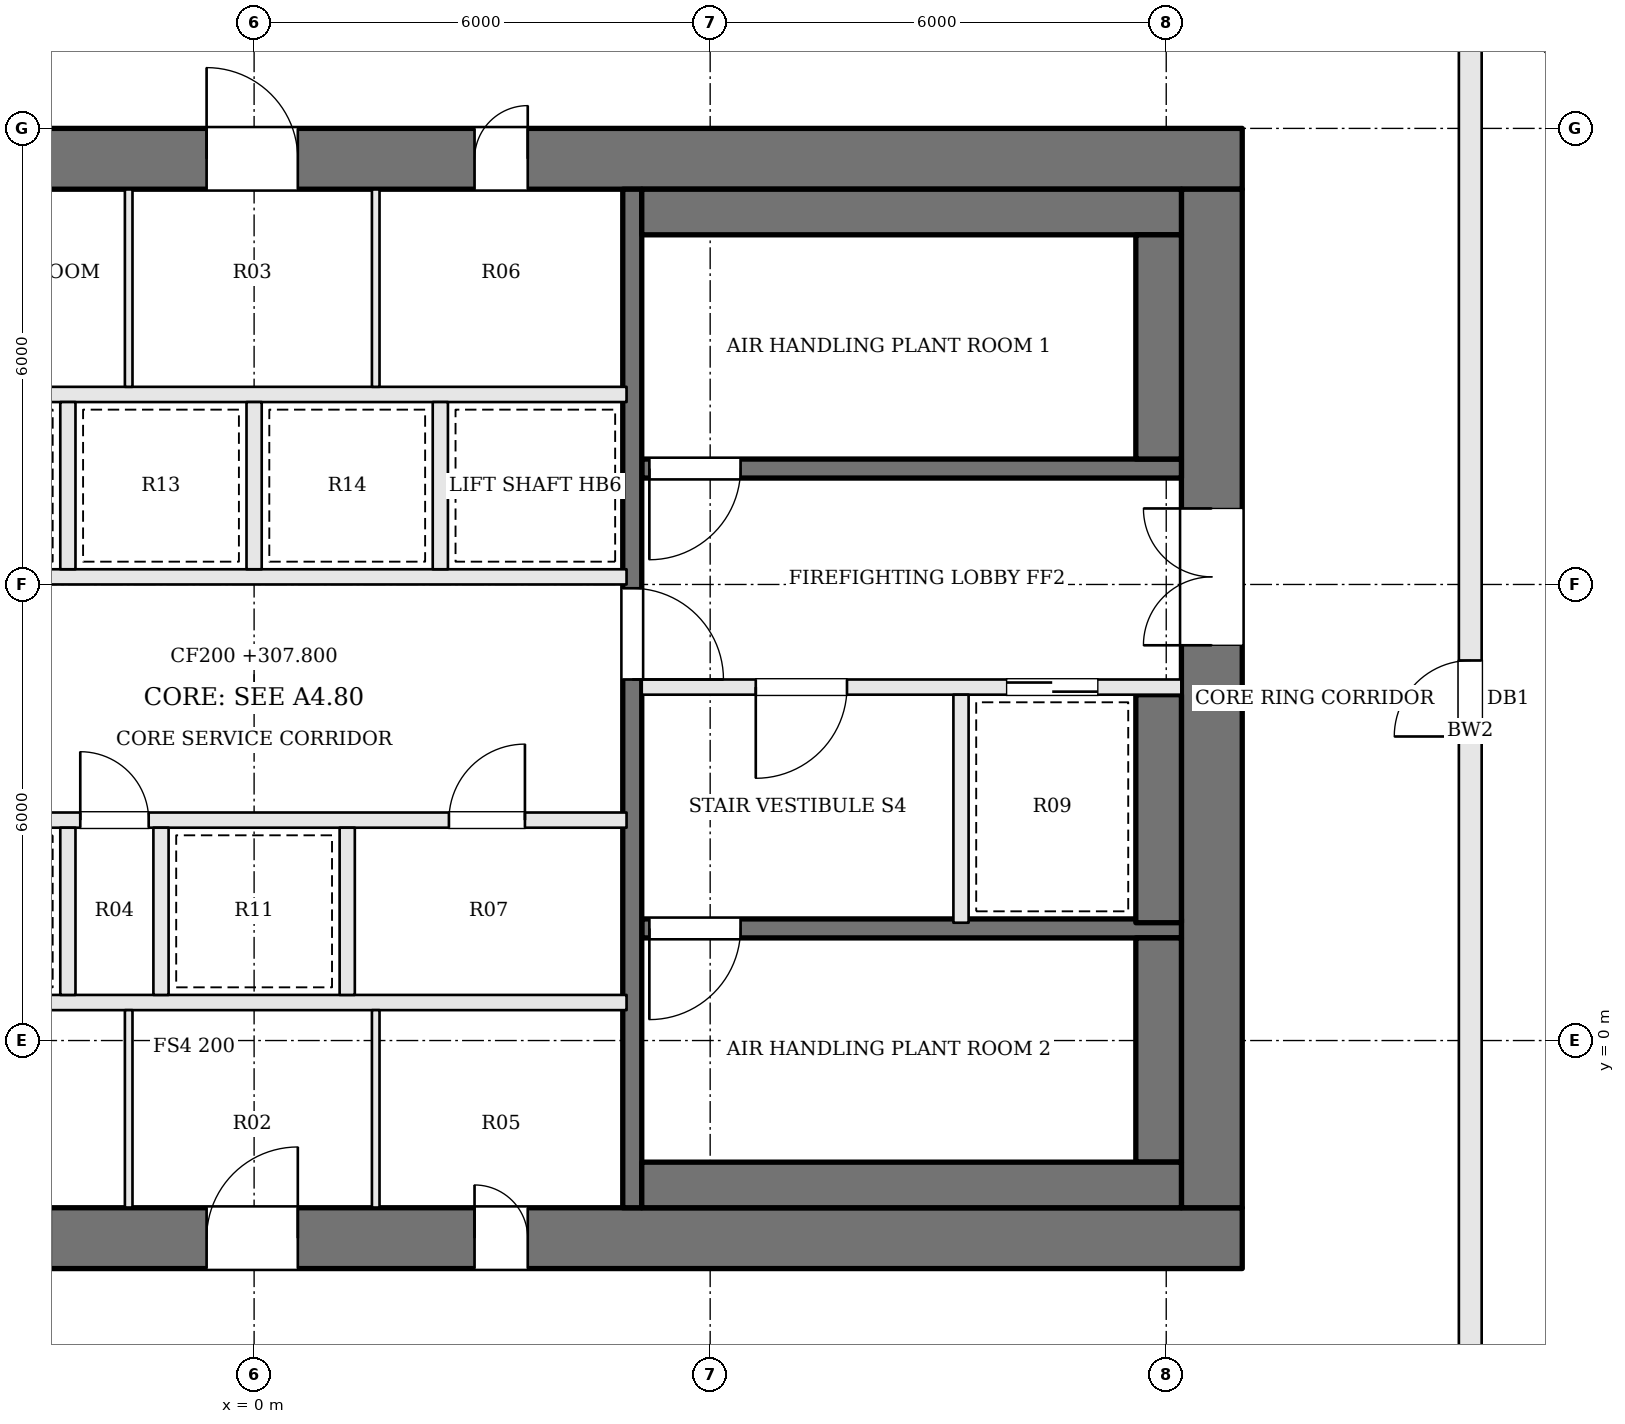
"""IFC4 building model, lengths in metres.
Left out: names, types, materials, properties, quantities, classifications, styles, units other than length and angle.
Written with IfcOpenShell. Run it as: python <this file> out.ifc"""

import sys

from ifc_helpers import new_model, si_unit, direction, frame, frame_2d, origin, place, context, subcontext, project, spatial, rectangle, extrude, element, fill, save


model = new_model("IFC4")
c1 = context("Model", 3, precision=1e-05, world=origin(), true_north=direction((0.0, 1.0)))
c2 = subcontext(c1, "Body", "Model", "MODEL_VIEW")
j1 = project(units=[si_unit("LENGTHUNIT", "METRE"), si_unit("PLANEANGLEUNIT", "RADIAN")], contexts=[c1])
p1 = place(None, origin())
s1 = spatial("IfcSite", under=j1, at=p1, CompositionType="ELEMENT")
p2 = place(p1, origin())
s2 = spatial("IfcBuilding", under=s1, at=p2, CompositionType="ELEMENT")
p3 = place(p2, frame((0.0, 0.0, 307.8)))
s3 = spatial("IfcBuildingStorey", under=s2, at=p3, CompositionType="ELEMENT", Elevation=307.8)
p4 = place(p3, frame((-13.0, 11.6, 0.0), z_axis=(0.0, 0.0, 1.0), x_axis=(1.0, 0.0, 0.0)))
e1 = element("IfcWall", 1, at=p4, inside=s3, PredefinedType="SHEAR", context=c2, shape_type="SweptSolid", body=[
    extrude(rectangle(XDim=26.0, YDim=0.8, at=frame_2d((13.0, 0.0))), origin(), (0.0, 0.0, 1.0), 4.2),
])
p5 = place(p4, frame((9.375, 0.0, 0.0)))
e2 = element("IfcOpeningElement", 2, at=p5, cuts=e1, PredefinedType="OPENING", context=c2, shape_type="SweptSolid", body=[
    extrude(rectangle(XDim=0.7, YDim=2.1, at=frame_2d((0.35, 1.05))), frame((0.0, 0.41, 0.0), z_axis=(0.0, -1.0, 0.0), x_axis=(1.0, 0.0, 0.0)), (0.0, 0.0, 1.0), 0.82),
])
p6 = place(p4, frame((12.375, 0.0, 0.0)))
e3 = element("IfcOpeningElement", 3, at=p6, cuts=e1, PredefinedType="OPENING", context=c2, shape_type="SweptSolid", body=[
    extrude(rectangle(XDim=1.2, YDim=2.1, at=frame_2d((0.6, 1.05))), frame((0.0, 0.41, 0.0), z_axis=(0.0, -1.0, 0.0), x_axis=(1.0, 0.0, 0.0)), (0.0, 0.0, 1.0), 0.82),
])
p7 = place(p4, frame((15.9, 0.0, 0.0)))
e4 = element("IfcOpeningElement", 4, at=p7, cuts=e1, PredefinedType="OPENING", context=c2, shape_type="SweptSolid", body=[
    extrude(rectangle(XDim=0.7, YDim=2.1, at=frame_2d((0.35, 1.05))), frame((0.0, 0.41, 0.0), z_axis=(0.0, -1.0, 0.0), x_axis=(1.0, 0.0, 0.0)), (0.0, 0.0, 1.0), 0.82),
])
p8 = place(p3, frame((-13.0, -2.6, 0.0), z_axis=(0.0, 0.0, 1.0), x_axis=(1.0, 0.0, 0.0)))
e5 = element("IfcWall", 5, at=p8, inside=s3, PredefinedType="SHEAR", context=c2, shape_type="SweptSolid", body=[
    extrude(rectangle(XDim=26.0, YDim=0.8, at=frame_2d((13.0, 0.0))), origin(), (0.0, 0.0, 1.0), 4.2),
])
p9 = place(p8, frame((9.125, 0.0, 0.0)))
e6 = element("IfcOpeningElement", 6, at=p9, cuts=e5, PredefinedType="OPENING", context=c2, shape_type="SweptSolid", body=[
    extrude(rectangle(XDim=1.2, YDim=2.1, at=frame_2d((0.6, 1.05))), frame((0.0, 0.41, 0.0), z_axis=(0.0, -1.0, 0.0), x_axis=(1.0, 0.0, 0.0)), (0.0, 0.0, 1.0), 0.82),
])
p10 = place(p8, frame((12.375, 0.0, 0.0)))
e7 = element("IfcOpeningElement", 7, at=p10, cuts=e5, PredefinedType="OPENING", context=c2, shape_type="SweptSolid", body=[
    extrude(rectangle(XDim=1.2, YDim=2.1, at=frame_2d((0.6, 1.05))), frame((0.0, 0.41, 0.0), z_axis=(0.0, -1.0, 0.0), x_axis=(1.0, 0.0, 0.0)), (0.0, 0.0, 1.0), 0.82),
])
p11 = place(p8, frame((15.9, 0.0, 0.0)))
e8 = element("IfcOpeningElement", 8, at=p11, cuts=e5, PredefinedType="OPENING", context=c2, shape_type="SweptSolid", body=[
    extrude(rectangle(XDim=0.7, YDim=2.1, at=frame_2d((0.35, 1.05))), frame((0.0, 0.41, 0.0), z_axis=(0.0, -1.0, 0.0), x_axis=(1.0, 0.0, 0.0)), (0.0, 0.0, 1.0), 0.82),
])
p12 = place(p3, frame((12.6, -2.2, 0.0), z_axis=(0.0, 0.0, 1.0), x_axis=(0.0, 1.0, 0.0)))
e9 = element("IfcWall", 9, at=p12, inside=s3, PredefinedType="SHEAR", context=c2, shape_type="SweptSolid", body=[
    extrude(rectangle(XDim=13.4, YDim=0.8, at=frame_2d((6.7, 0.0))), origin(), (0.0, 0.0, 1.0), 4.2),
])
p13 = place(p12, frame((7.4, 0.0, 0.0)))
e10 = element("IfcOpeningElement", 10, at=p13, cuts=e9, PredefinedType="OPENING", context=c2, shape_type="SweptSolid", body=[
    extrude(rectangle(XDim=1.8, YDim=2.1, at=frame_2d((0.9, 1.05))), frame((0.0, 0.41, 0.0), z_axis=(0.0, -1.0, 0.0), x_axis=(1.0, 0.0, 0.0)), (0.0, 0.0, 1.0), 0.82),
])
p14 = place(p3, frame((12.2, 7.525, 0.0), z_axis=(0.0, 0.0, 1.0), x_axis=(-1.0, 0.0, 0.0)))
e11 = element("IfcWall", 11, at=p14, inside=s3, PredefinedType="SOLIDWALL", context=c2, shape_type="SweptSolid", body=[
    extrude(rectangle(XDim=7.1, YDim=0.25, at=frame_2d((3.55, 0.0))), origin(), (0.0, 0.0, 1.0), 4.0),
])
p15 = place(p14, frame((5.8, 0.0, 0.0)))
e12 = element("IfcOpeningElement", 12, at=p15, cuts=e11, PredefinedType="OPENING", context=c2, shape_type="SweptSolid", body=[
    extrude(rectangle(XDim=1.2, YDim=2.1, at=frame_2d((0.6, 1.05))), frame((0.0, 0.135, 0.0), z_axis=(0.0, -1.0, 0.0), x_axis=(1.0, 0.0, 0.0)), (0.0, 0.0, 1.0), 0.27),
])
p16 = place(p3, frame((12.2, 4.65, 0.0), z_axis=(0.0, 0.0, 1.0), x_axis=(-1.0, 0.0, 0.0)))
e13 = element("IfcWall", 13, at=p16, inside=s3, PredefinedType="SOLIDWALL", context=c2, shape_type="SweptSolid", body=[
    extrude(rectangle(XDim=7.1, YDim=0.2, at=frame_2d((3.55, 0.0))), origin(), (0.0, 0.0, 1.0), 4.0),
])
p17 = place(p16, frame((4.4, 0.0, 0.0)))
e14 = element("IfcOpeningElement", 14, at=p17, cuts=e13, PredefinedType="OPENING", context=c2, shape_type="SweptSolid", body=[
    extrude(rectangle(XDim=1.2, YDim=2.1, at=frame_2d((0.6, 1.05))), frame((0.0, 0.11, 0.0), z_axis=(0.0, -1.0, 0.0), x_axis=(1.0, 0.0, 0.0)), (0.0, 0.0, 1.0), 0.22),
])
p18 = place(p16, frame((1.1, 0.0, 0.0)))
e15 = element("IfcOpeningElement", 15, at=p18, cuts=e13, PredefinedType="OPENING", context=c2, shape_type="SweptSolid", body=[
    extrude(rectangle(XDim=1.2, YDim=2.1, at=frame_2d((0.6, 1.05))), frame((0.0, 0.11, 0.0), z_axis=(0.0, -1.0, 0.0), x_axis=(1.0, 0.0, 0.0)), (0.0, 0.0, 1.0), 0.22),
])
p19 = place(p3, frame((12.2, 1.475, 0.0), z_axis=(0.0, 0.0, 1.0), x_axis=(-1.0, 0.0, 0.0)))
e16 = element("IfcWall", 16, at=p19, inside=s3, PredefinedType="SOLIDWALL", context=c2, shape_type="SweptSolid", body=[
    extrude(rectangle(XDim=7.1, YDim=0.25, at=frame_2d((3.55, 0.0))), origin(), (0.0, 0.0, 1.0), 4.0),
])
p20 = place(p19, frame((5.8, 0.0, 0.0)))
e17 = element("IfcOpeningElement", 17, at=p20, cuts=e16, PredefinedType="OPENING", context=c2, shape_type="SweptSolid", body=[
    extrude(rectangle(XDim=1.2, YDim=2.1, at=frame_2d((0.6, 1.05))), frame((0.0, 0.135, 0.0), z_axis=(0.0, -1.0, 0.0), x_axis=(1.0, 0.0, 0.0)), (0.0, 0.0, 1.0), 0.27),
])
p21 = place(p3, frame((9.3, 4.55, 0.0), z_axis=(0.0, 0.0, 1.0), x_axis=(0.0, -1.0, 0.0)))
e18 = element("IfcWall", 18, at=p21, inside=s3, PredefinedType="SOLIDWALL", context=c2, shape_type="SweptSolid", body=[
    extrude(rectangle(XDim=3.0, YDim=0.2, at=frame_2d((1.5, 0.0))), origin(), (0.0, 0.0, 1.0), 4.0),
])
p22 = place(p3, frame((4.975, 11.2, 0.0), z_axis=(0.0, 0.0, 1.0), x_axis=(0.0, -1.0, 0.0)))
e19 = element("IfcWall", 19, at=p22, inside=s3, PredefinedType="SOLIDWALL", context=c2, shape_type="SweptSolid", body=[
    extrude(rectangle(XDim=13.4, YDim=0.25, at=frame_2d((6.7, 0.0))), origin(), (0.0, 0.0, 1.0), 4.0),
])
p23 = place(p22, frame((5.25, 0.0, 0.0)))
e20 = element("IfcOpeningElement", 20, at=p23, cuts=e19, PredefinedType="OPENING", context=c2, shape_type="SweptSolid", body=[
    extrude(rectangle(XDim=1.2, YDim=2.1, at=frame_2d((0.6, 1.05))), frame((0.0, 0.135, 0.0), z_axis=(0.0, -1.0, 0.0), x_axis=(1.0, 0.0, 0.0)), (0.0, 0.0, 1.0), 0.27),
])
p24 = place(p3, frame((12.2, 10.9, 0.0), z_axis=(0.0, 0.0, 1.0), x_axis=(-1.0, 0.0, 0.0)))
e21 = element("IfcWall", 21, at=p24, inside=s3, PredefinedType="SOLIDWALL", context=c2, shape_type="SweptSolid", body=[
    extrude(rectangle(XDim=7.1, YDim=0.6, at=frame_2d((3.55, 0.0))), origin(), (0.0, 0.0, 1.0), 4.0),
])
p25 = place(p3, frame((11.9, 10.6, 0.0), z_axis=(0.0, 0.0, 1.0), x_axis=(0.0, -1.0, 0.0)))
e22 = element("IfcWall", 22, at=p25, inside=s3, PredefinedType="SOLIDWALL", context=c2, shape_type="SweptSolid", body=[
    extrude(rectangle(XDim=2.95, YDim=0.6, at=frame_2d((1.475, 0.0))), origin(), (0.0, 0.0, 1.0), 4.0),
])
p26 = place(p3, frame((11.9, 4.55, 0.0), z_axis=(0.0, 0.0, 1.0), x_axis=(0.0, -1.0, 0.0)))
e23 = element("IfcWall", 23, at=p26, inside=s3, PredefinedType="SOLIDWALL", context=c2, shape_type="SweptSolid", body=[
    extrude(rectangle(XDim=3.0, YDim=0.6, at=frame_2d((1.5, 0.0))), origin(), (0.0, 0.0, 1.0), 4.0),
])
p27 = place(p3, frame((11.9, 1.35, 0.0), z_axis=(0.0, 0.0, 1.0), x_axis=(0.0, -1.0, 0.0)))
e24 = element("IfcWall", 24, at=p27, inside=s3, PredefinedType="SOLIDWALL", context=c2, shape_type="SweptSolid", body=[
    extrude(rectangle(XDim=2.95, YDim=0.6, at=frame_2d((1.475, 0.0))), origin(), (0.0, 0.0, 1.0), 4.0),
])
p28 = place(p3, frame((12.2, -1.9, 0.0), z_axis=(0.0, 0.0, 1.0), x_axis=(-1.0, 0.0, 0.0)))
e25 = element("IfcWall", 25, at=p28, inside=s3, PredefinedType="SOLIDWALL", context=c2, shape_type="SweptSolid", body=[
    extrude(rectangle(XDim=7.1, YDim=0.6, at=frame_2d((3.55, 0.0))), origin(), (0.0, 0.0, 1.0), 4.0),
])
p29 = place(p3, frame((-4.9, 0.5, 0.0), z_axis=(0.0, 0.0, 1.0), x_axis=(1.0, 0.0, 0.0)))
e26 = element("IfcWall", 26, at=p29, inside=s3, PredefinedType="SOLIDWALL", context=c2, shape_type="SweptSolid", body=[
    extrude(rectangle(XDim=9.8, YDim=0.2, at=frame_2d((4.9, 0.0))), origin(), (0.0, 0.0, 1.0), 4.0),
])
p30 = place(p3, frame((-4.9, 2.9, 0.0), z_axis=(0.0, 0.0, 1.0), x_axis=(1.0, 0.0, 0.0)))
e27 = element("IfcWall", 27, at=p30, inside=s3, PredefinedType="SOLIDWALL", context=c2, shape_type="SweptSolid", body=[
    extrude(rectangle(XDim=9.8, YDim=0.2, at=frame_2d((4.9, 0.0))), origin(), (0.0, 0.0, 1.0), 4.0),
])
p31 = place(p30, frame((2.613, 0.0, 0.0)))
e28 = element("IfcOpeningElement", 28, at=p31, cuts=e27, PredefinedType="OPENING", context=c2, shape_type="SweptSolid", body=[
    extrude(rectangle(XDim=0.9, YDim=2.1, at=frame_2d((0.45, 1.05))), frame((0.0, 0.11, 0.0), z_axis=(0.0, -1.0, 0.0), x_axis=(1.0, 0.0, 0.0)), (0.0, 0.0, 1.0), 0.22),
])
p32 = place(p30, frame((7.463, 0.0, 0.0)))
e29 = element("IfcOpeningElement", 29, at=p32, cuts=e27, PredefinedType="OPENING", context=c2, shape_type="SweptSolid", body=[
    extrude(rectangle(XDim=1.0, YDim=2.1, at=frame_2d((0.5, 1.05))), frame((0.0, 0.11, 0.0), z_axis=(0.0, -1.0, 0.0), x_axis=(1.0, 0.0, 0.0)), (0.0, 0.0, 1.0), 0.22),
])
for number, where, z_axis, x_axis in (
    (30, (-4.9, 6.1, 0.0), (0.0, 0.0, 1.0), (1.0, 0.0, 0.0)),
    (31, (-4.9, 8.5, 0.0), (0.0, 0.0, 1.0), (1.0, 0.0, 0.0)),
):
    element("IfcWall", number, at=place(p3, frame(where, z_axis=z_axis, x_axis=x_axis)), inside=s3, PredefinedType="SOLIDWALL", context=c2, shape_type="SweptSolid", body=[
        extrude(rectangle(XDim=9.8, YDim=0.2, at=frame_2d((4.9, 0.0))), origin(), (0.0, 0.0, 1.0), 4.0),
    ])
for number, where, z_axis, x_axis in (
    (32, (-2.45, 0.6, 0.0), (0.0, 0.0, 1.0), (0.0, 1.0, 0.0)),
    (33, (-1.225, 0.6, 0.0), (0.0, 0.0, 1.0), (0.0, 1.0, 0.0)),
    (34, (1.225, 0.6, 0.0), (0.0, 0.0, 1.0), (0.0, 1.0, 0.0)),
    (35, (-2.45, 6.2, 0.0), (0.0, 0.0, 1.0), (0.0, 1.0, 0.0)),
    (36, (0.0, 6.2, 0.0), (0.0, 0.0, 1.0), (0.0, 1.0, 0.0)),
    (37, (2.45, 6.2, 0.0), (0.0, 0.0, 1.0), (0.0, 1.0, 0.0)),
):
    element("IfcWall", number, at=place(p3, frame(where, z_axis=z_axis, x_axis=x_axis)), inside=s3, PredefinedType="SOLIDWALL", context=c2, shape_type="SweptSolid", body=[
        extrude(rectangle(XDim=2.2, YDim=0.2, at=frame_2d((1.1, 0.0))), origin(), (0.0, 0.0, 1.0), 4.0),
    ])
for number, where, z_axis, x_axis in (
    (38, (-1.65, -2.2, 0.0), (0.0, 0.0, 1.0), (0.0, 1.0, 0.0)),
    (39, (1.6, -2.2, 0.0), (0.0, 0.0, 1.0), (0.0, 1.0, 0.0)),
    (40, (-1.65, 8.6, 0.0), (0.0, 0.0, 1.0), (0.0, 1.0, 0.0)),
    (41, (1.6, 8.6, 0.0), (0.0, 0.0, 1.0), (0.0, 1.0, 0.0)),
):
    element("IfcWall", number, at=place(p3, frame(where, z_axis=z_axis, x_axis=x_axis)), inside=s3, PredefinedType="PARTITIONING", context=c2, shape_type="SweptSolid", body=[
        extrude(rectangle(XDim=2.6, YDim=0.1, at=frame_2d((1.3, 0.0))), origin(), (0.0, 0.0, 1.0), 4.0),
    ])
p33 = place(p3, frame((15.891, 14.251, 0.0), z_axis=(0.0, 0.0, 1.0), x_axis=(0.726669936256, -0.686986756598, 0.0)))
e42 = element("IfcWall", 42, at=p33, inside=s3, PredefinedType="SOLIDWALL", context=c2, shape_type="SweptSolid", body=[
    extrude(rectangle(XDim=8.09, YDim=0.3, at=frame_2d((4.045, 0.0))), origin(), (0.0, 0.0, 1.0), 3.484),
])
p34 = place(p3, frame((16.0, -5.85, 0.0), z_axis=(0.0, 0.0, 1.0), x_axis=(0.0, 1.0, 0.0)))
e43 = element("IfcWall", 43, at=p34, inside=s3, PredefinedType="SOLIDWALL", context=c2, shape_type="SweptSolid", body=[
    extrude(rectangle(XDim=19.848, YDim=0.3, at=frame_2d((9.924, 0.0))), origin(), (0.0, 0.0, 1.0), 3.484),
])
p35 = place(p34, frame((9.85, 0.0, 0.0)))
e44 = element("IfcOpeningElement", 44, at=p35, cuts=e43, PredefinedType="OPENING", context=c2, shape_type="SweptSolid", body=[
    extrude(rectangle(XDim=1.0, YDim=2.1, at=frame_2d((0.5, 1.05))), frame((0.0, 0.16, 0.0), z_axis=(0.0, -1.0, 0.0), x_axis=(1.0, 0.0, 0.0)), (0.0, 0.0, 1.0), 0.32),
])
p36 = place(p13, origin())
e45 = element("IfcDoor", 45, at=p36, inside=s3, OperationType="DOUBLE_DOOR_SINGLE_SWING", PredefinedType="DOOR", context=c2, shape_type="SweptSolid", body=[
    extrude(rectangle(XDim=1.8, YDim=2.1, at=frame_2d((0.9, 1.05))), frame((0.0, 0.025, 0.0), z_axis=(0.0, -1.0, 0.0), x_axis=(1.0, 0.0, 0.0)), (0.0, 0.0, 1.0), 0.05),
])
fill(e10, e45)
p37 = place(p23, origin())
e46 = element("IfcDoor", 46, at=p37, inside=s3, OperationType="SINGLE_SWING_RIGHT", PredefinedType="DOOR", context=c2, shape_type="SweptSolid", body=[
    extrude(rectangle(XDim=1.2, YDim=2.1, at=frame_2d((0.6, 1.05))), frame((0.0, 0.025, 0.0), z_axis=(0.0, -1.0, 0.0), x_axis=(1.0, 0.0, 0.0)), (0.0, 0.0, 1.0), 0.05),
])
fill(e20, e46)
p38 = place(p17, origin())
e47 = element("IfcDoor", 47, at=p38, inside=s3, OperationType="SINGLE_SWING_RIGHT", PredefinedType="DOOR", context=c2, shape_type="SweptSolid", body=[
    extrude(rectangle(XDim=1.2, YDim=2.1, at=frame_2d((0.6, 1.05))), frame((0.0, 0.025, 0.0), z_axis=(0.0, -1.0, 0.0), x_axis=(1.0, 0.0, 0.0)), (0.0, 0.0, 1.0), 0.05),
])
fill(e14, e47)
p39 = place(p15, origin())
e48 = element("IfcDoor", 48, at=p39, inside=s3, OperationType="SINGLE_SWING_RIGHT", PredefinedType="DOOR", context=c2, shape_type="SweptSolid", body=[
    extrude(rectangle(XDim=1.2, YDim=2.1, at=frame_2d((0.6, 1.05))), frame((0.0, 0.025, 0.0), z_axis=(0.0, -1.0, 0.0), x_axis=(1.0, 0.0, 0.0)), (0.0, 0.0, 1.0), 0.05),
])
fill(e12, e48)
p40 = place(p20, origin())
e49 = element("IfcDoor", 49, at=p40, inside=s3, OperationType="SINGLE_SWING_RIGHT", PredefinedType="DOOR", context=c2, shape_type="SweptSolid", body=[
    extrude(rectangle(XDim=1.2, YDim=2.1, at=frame_2d((0.6, 1.05))), frame((0.0, 0.025, 0.0), z_axis=(0.0, -1.0, 0.0), x_axis=(1.0, 0.0, 0.0)), (0.0, 0.0, 1.0), 0.05),
])
fill(e17, e49)
p41 = place(p18, origin())
e50 = element("IfcDoor", 50, at=p41, inside=s3, OperationType="SLIDING_TO_RIGHT", PredefinedType="DOOR", context=c2, shape_type="SweptSolid", body=[
    extrude(rectangle(XDim=1.2, YDim=2.1, at=frame_2d((0.6, 1.05))), frame((0.0, 0.025, 0.0), z_axis=(0.0, -1.0, 0.0), x_axis=(1.0, 0.0, 0.0)), (0.0, 0.0, 1.0), 0.05),
])
fill(e15, e50)
p42 = place(p31, origin())
e51 = element("IfcDoor", 51, at=p42, inside=s3, OperationType="SINGLE_SWING_LEFT", PredefinedType="DOOR", context=c2, shape_type="SweptSolid", body=[
    extrude(rectangle(XDim=0.9, YDim=2.1, at=frame_2d((0.45, 1.05))), frame((0.0, 0.025, 0.0), z_axis=(0.0, -1.0, 0.0), x_axis=(1.0, 0.0, 0.0)), (0.0, 0.0, 1.0), 0.05),
])
fill(e28, e51)
p43 = place(p32, origin())
e52 = element("IfcDoor", 52, at=p43, inside=s3, OperationType="SINGLE_SWING_RIGHT", PredefinedType="DOOR", context=c2, shape_type="SweptSolid", body=[
    extrude(rectangle(XDim=1.0, YDim=2.1, at=frame_2d((0.5, 1.05))), frame((0.0, 0.025, 0.0), z_axis=(0.0, -1.0, 0.0), x_axis=(1.0, 0.0, 0.0)), (0.0, 0.0, 1.0), 0.05),
])
fill(e29, e52)
p44 = place(p10, origin())
e53 = element("IfcDoor", 53, at=p44, inside=s3, OperationType="SINGLE_SWING_RIGHT", PredefinedType="DOOR", context=c2, shape_type="SweptSolid", body=[
    extrude(rectangle(XDim=1.2, YDim=2.1, at=frame_2d((0.6, 1.05))), frame((0.0, 0.025, 0.0), z_axis=(0.0, -1.0, 0.0), x_axis=(1.0, 0.0, 0.0)), (0.0, 0.0, 1.0), 0.05),
])
fill(e7, e53)
p45 = place(p11, origin())
e54 = element("IfcDoor", 54, at=p45, inside=s3, OperationType="SINGLE_SWING_LEFT", PredefinedType="DOOR", context=c2, shape_type="SweptSolid", body=[
    extrude(rectangle(XDim=0.7, YDim=2.1, at=frame_2d((0.35, 1.05))), frame((0.0, 0.025, 0.0), z_axis=(0.0, -1.0, 0.0), x_axis=(1.0, 0.0, 0.0)), (0.0, 0.0, 1.0), 0.05),
])
fill(e8, e54)
p46 = place(p6, origin())
e55 = element("IfcDoor", 55, at=p46, inside=s3, OperationType="SINGLE_SWING_LEFT", PredefinedType="DOOR", context=c2, shape_type="SweptSolid", body=[
    extrude(rectangle(XDim=1.2, YDim=2.1, at=frame_2d((0.6, 1.05))), frame((0.0, 0.025, 0.0), z_axis=(0.0, -1.0, 0.0), x_axis=(1.0, 0.0, 0.0)), (0.0, 0.0, 1.0), 0.05),
])
fill(e3, e55)
p47 = place(p7, origin())
e56 = element("IfcDoor", 56, at=p47, inside=s3, OperationType="SINGLE_SWING_RIGHT", PredefinedType="DOOR", context=c2, shape_type="SweptSolid", body=[
    extrude(rectangle(XDim=0.7, YDim=2.1, at=frame_2d((0.35, 1.05))), frame((0.0, 0.025, 0.0), z_axis=(0.0, -1.0, 0.0), x_axis=(1.0, 0.0, 0.0)), (0.0, 0.0, 1.0), 0.05),
])
fill(e4, e56)
p48 = place(p35, origin())
e57 = element("IfcDoor", 57, at=p48, inside=s3, OperationType="SINGLE_SWING_LEFT", PredefinedType="DOOR", context=c2, shape_type="SweptSolid", body=[
    extrude(rectangle(XDim=1.0, YDim=2.1, at=frame_2d((0.5, 1.05))), frame((0.0, 0.025, 0.0), z_axis=(0.0, -1.0, 0.0), x_axis=(1.0, 0.0, 0.0)), (0.0, 0.0, 1.0), 0.05),
])
fill(e44, e57)
save(model, sys.argv[1])
